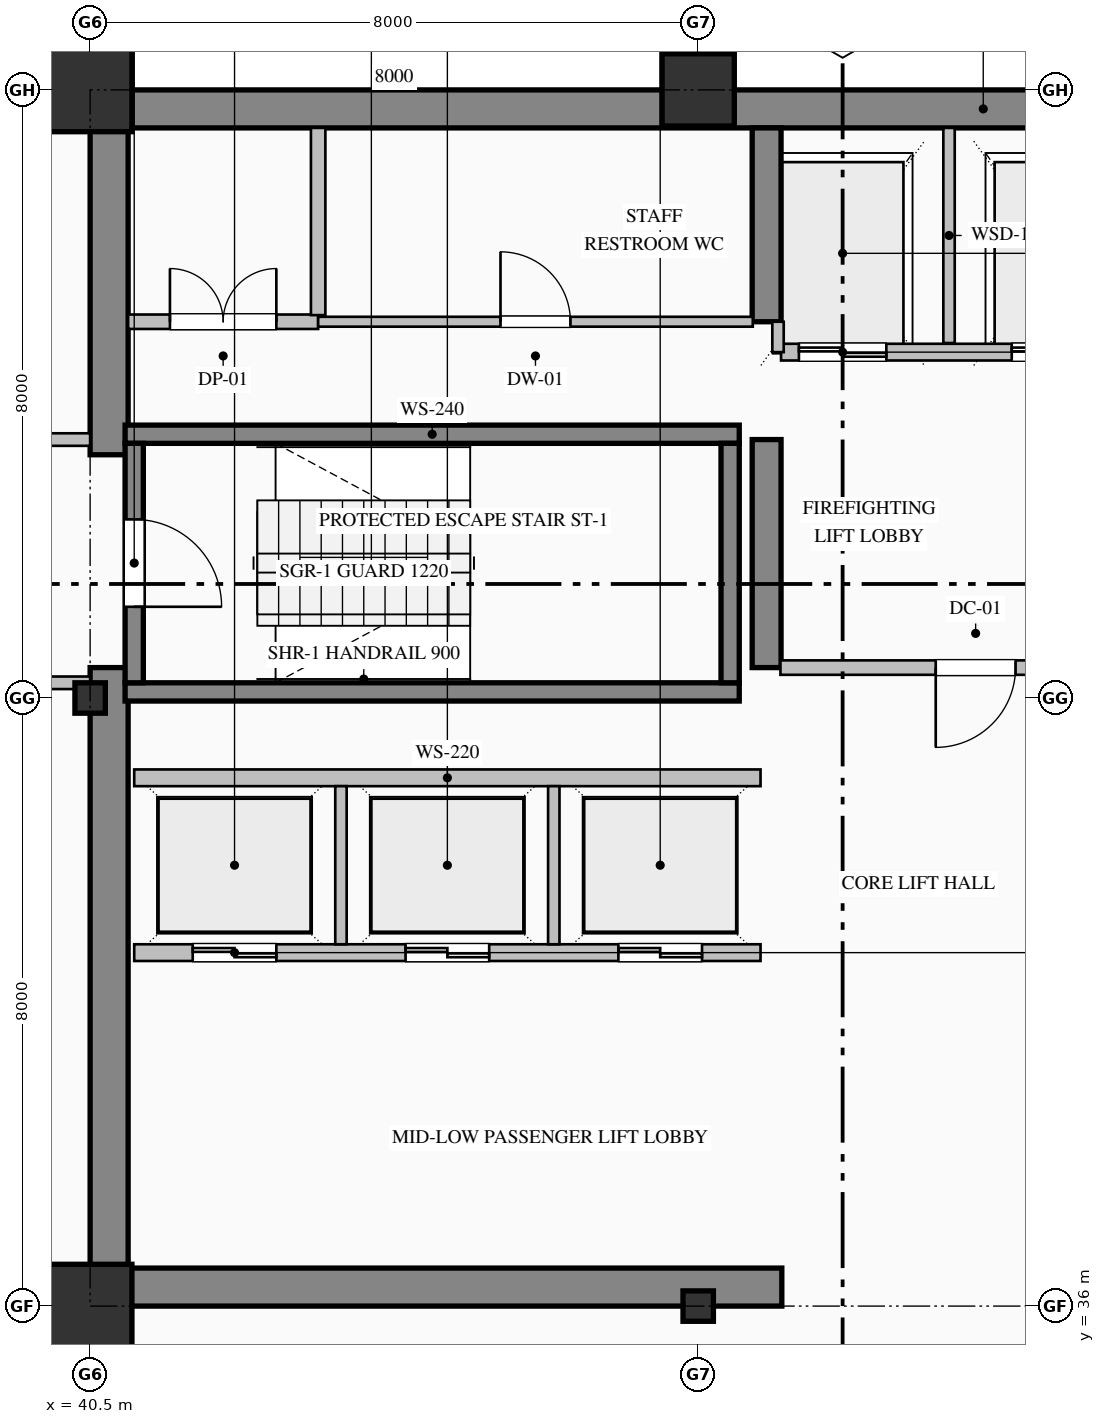
"""IFC4 building model, lengths in metres.
Left out: names, types, materials, properties, quantities, classifications, styles, units other than length and angle.
Written with IfcOpenShell. Run it as: python <this file> out.ifc"""

import sys

from ifc_helpers import new_model, si_unit, direction, frame, frame_2d, origin, origin_2d, place, context, subcontext, project, spatial, rectangle, hollow_rectangle, i_section, extrude, element, fill, save


model = new_model("IFC4")
c1 = context("Model", 3, precision=1e-05, world=origin(), true_north=direction((0.0, 1.0)))
c2 = subcontext(c1, "Body", "Model", "MODEL_VIEW")
j1 = project(units=[si_unit("LENGTHUNIT", "METRE"), si_unit("PLANEANGLEUNIT", "RADIAN")], contexts=[c1])
p1 = place(None, origin())
s1 = spatial("IfcSite", under=j1, at=p1, CompositionType="ELEMENT")
p2 = place(p1, origin())
s2 = spatial("IfcBuilding", under=s1, at=p2, CompositionType="ELEMENT")
p3 = place(p2, frame((0.0, 0.0, 179.0)))
s3 = spatial("IfcBuildingStorey", under=s2, at=p3, CompositionType="ELEMENT", Elevation=179.0)
p4 = place(p3, frame((40.5, 51.75, 0.0), z_axis=(0.0, 0.0, 1.0), x_axis=(1.0, 0.0, 0.0)))
e1 = element("IfcWall", 1, at=p4, inside=s3, PredefinedType="SHEAR", context=c2, shape_type="SweptSolid", body=[
    extrude(rectangle(XDim=23.5, YDim=0.5, at=frame_2d((11.75, 0.0))), origin(), (0.0, 0.0, 1.0), 3.765),
])
p5 = place(p3, frame((40.75, 36.5, 0.0), z_axis=(0.0, 0.0, 1.0), x_axis=(0.0, 1.0, 0.0)))
e2 = element("IfcWall", 2, at=p5, inside=s3, PredefinedType="SHEAR", context=c2, shape_type="SweptSolid", body=[
    extrude(rectangle(XDim=7.9, YDim=0.5, at=frame_2d((3.95, 0.0))), origin(), (0.0, 0.0, 1.0), 3.765),
])
p6 = place(p3, frame((40.75, 47.2, 0.0), z_axis=(0.0, 0.0, 1.0), x_axis=(0.0, 1.0, 0.0)))
e3 = element("IfcWall", 3, at=p6, inside=s3, PredefinedType="SHEAR", context=c2, shape_type="SweptSolid", body=[
    extrude(rectangle(XDim=4.3, YDim=0.5, at=frame_2d((2.15, 0.0))), origin(), (0.0, 0.0, 1.0), 3.765),
])
p7 = place(p3, frame((40.5, 36.25, 0.0), z_axis=(0.0, 0.0, 1.0), x_axis=(1.0, 0.0, 0.0)))
e4 = element("IfcWall", 4, at=p7, inside=s3, PredefinedType="SHEAR", context=c2, shape_type="SweptSolid", body=[
    extrude(rectangle(XDim=9.1, YDim=0.5, at=frame_2d((4.55, 0.0))), origin(), (0.0, 0.0, 1.0), 3.765),
])
p8 = place(p3, frame((49.4, 44.4, 0.0), z_axis=(0.0, 0.0, 1.0), x_axis=(0.0, 1.0, 0.0)))
e5 = element("IfcWall", 5, at=p8, inside=s3, PredefinedType="SHEAR", context=c2, shape_type="SweptSolid", body=[
    extrude(rectangle(XDim=3.0, YDim=0.38, at=frame_2d((1.5, 0.0))), origin(), (0.0, 0.0, 1.0), 3.765),
])
p9 = place(p3, frame((49.4, 48.95, 0.0), z_axis=(0.0, 0.0, 1.0), x_axis=(0.0, 1.0, 0.0)))
e6 = element("IfcWall", 6, at=p9, inside=s3, PredefinedType="SHEAR", context=c2, shape_type="SweptSolid", body=[
    extrude(rectangle(XDim=2.55, YDim=0.38, at=frame_2d((1.275, 0.0))), origin(), (0.0, 0.0, 1.0), 3.765),
])
p10 = place(p3, frame((40.5, 36.0, 0.0), z_axis=(0.0, 0.0, 1.0), x_axis=(1.0, 0.0, 0.0)))
e7 = element("IfcColumn", 7, at=p10, inside=s3, PredefinedType="COLUMN", context=c2, shape_type="SweptSolid", body=[
    extrude(hollow_rectangle(XDim=1.1, YDim=1.1, WallThickness=0.04, at=origin_2d()), origin(), (0.0, 0.0, 1.0), 4.0),
])
p11 = place(p3, frame((40.5, 44.0, 0.0), z_axis=(0.0, 0.0, 1.0), x_axis=(1.0, 0.0, 0.0)))
e8 = element("IfcColumn", 8, at=p11, inside=s3, PredefinedType="COLUMN", context=c2, shape_type="SweptSolid", body=[
    extrude(i_section(OverallWidth=0.4, OverallDepth=0.4, WebThickness=0.013, FlangeThickness=0.021, FilletRadius=0.022, at=origin_2d()), origin(), (0.0, 0.0, 1.0), 4.0),
])
p12 = place(p3, frame((40.5, 52.0, 0.0), z_axis=(0.0, 0.0, 1.0), x_axis=(1.0, 0.0, 0.0)))
e9 = element("IfcColumn", 9, at=p12, inside=s3, PredefinedType="COLUMN", context=c2, shape_type="SweptSolid", body=[
    extrude(hollow_rectangle(XDim=1.1, YDim=1.1, WallThickness=0.04, at=origin_2d()), origin(), (0.0, 0.0, 1.0), 4.0),
])
p13 = place(p3, frame((48.5, 36.0, 0.0), z_axis=(0.0, 0.0, 1.0), x_axis=(1.0, 0.0, 0.0)))
e10 = element("IfcColumn", 10, at=p13, inside=s3, PredefinedType="COLUMN", context=c2, shape_type="SweptSolid", body=[
    extrude(i_section(OverallWidth=0.4, OverallDepth=0.4, WebThickness=0.013, FlangeThickness=0.021, FilletRadius=0.022, at=origin_2d()), origin(), (0.0, 0.0, 1.0), 4.0),
])
p14 = place(p3, frame((48.5, 52.0, 0.0), z_axis=(0.0, 0.0, 1.0), x_axis=(1.0, 0.0, 0.0)))
e11 = element("IfcColumn", 11, at=p14, inside=s3, PredefinedType="COLUMN", context=c2, shape_type="SweptSolid", body=[
    extrude(hollow_rectangle(XDim=0.95, YDim=0.95, WallThickness=0.036, at=origin_2d()), origin(), (0.0, 0.0, 1.0), 4.0),
])
p15 = place(p3, frame((13.0, 51.82, 0.0), z_axis=(0.0, 0.0, 1.0), x_axis=(1.0, 0.0, 0.0)))
e12 = element("IfcWall", 12, at=p15, inside=s3, PredefinedType="SOLIDWALL", context=c2, shape_type="SweptSolid", body=[
    extrude(rectangle(XDim=27.52, YDim=0.36, at=frame_2d((13.76, 0.0))), origin(), (0.0, 0.0, 1.0), 3.265),
])
p16 = place(p15, frame((6.375, 0.0, 0.85)))
e13 = element("IfcOpeningElement", 13, at=p16, cuts=e12, PredefinedType="OPENING", context=c2, shape_type="SweptSolid", body=[
    extrude(rectangle(XDim=1.65, YDim=1.95, at=frame_2d((0.825, 0.975))), frame((0.0, 0.19, 0.0), z_axis=(0.0, -1.0, 0.0), x_axis=(1.0, 0.0, 0.0)), (0.0, 0.0, 1.0), 0.38),
])
p17 = place(p15, frame((13.65, 0.0, 0.85)))
e14 = element("IfcOpeningElement", 14, at=p17, cuts=e12, PredefinedType="OPENING", context=c2, shape_type="SweptSolid", body=[
    extrude(rectangle(XDim=1.5, YDim=1.95, at=frame_2d((0.75, 0.975))), frame((0.0, 0.19, 0.0), z_axis=(0.0, -1.0, 0.0), x_axis=(1.0, 0.0, 0.0)), (0.0, 0.0, 1.0), 0.38),
])
for number, where, z_axis, x_axis in (
    (15, (40.96, 47.47, 0.0), (0.0, 0.0, 1.0), (1.0, 0.0, 0.0)),
    (16, (49.04, 44.08, 0.0), (0.0, 0.0, 1.0), (-1.0, 0.0, 0.0)),
):
    element("IfcWall", number, at=place(p3, frame(where, z_axis=z_axis, x_axis=x_axis)), inside=s3, PredefinedType="SOLIDWALL", context=c2, shape_type="SweptSolid", body=[
        extrude(rectangle(XDim=8.08, YDim=0.24, at=frame_2d((4.04, 0.0))), origin(), (0.0, 0.0, 1.0), 4.0),
    ])
p18 = place(p3, frame((41.08, 47.35, 0.0), z_axis=(0.0, 0.0, 1.0), x_axis=(0.0, -1.0, 0.0)))
e17 = element("IfcWall", 17, at=p18, inside=s3, PredefinedType="SOLIDWALL", context=c2, shape_type="SweptSolid", body=[
    extrude(rectangle(XDim=3.15, YDim=0.24, at=frame_2d((1.575, 0.0))), origin(), (0.0, 0.0, 1.0), 4.0),
])
p19 = place(p18, frame((1.0, 0.0, 0.0)))
e18 = element("IfcOpeningElement", 18, at=p19, cuts=e17, PredefinedType="OPENING", context=c2, shape_type="SweptSolid", body=[
    extrude(rectangle(XDim=1.15, YDim=2.2, at=frame_2d((0.575, 1.1))), frame((0.0, 0.13, 0.0), z_axis=(0.0, -1.0, 0.0), x_axis=(1.0, 0.0, 0.0)), (0.0, 0.0, 1.0), 0.26),
])
p20 = place(p3, frame((48.92, 44.2, 0.0), z_axis=(0.0, 0.0, 1.0), x_axis=(0.0, 1.0, 0.0)))
e19 = element("IfcWall", 19, at=p20, inside=s3, PredefinedType="SOLIDWALL", context=c2, shape_type="SweptSolid", body=[
    extrude(rectangle(XDim=3.15, YDim=0.24, at=frame_2d((1.575, 0.0))), origin(), (0.0, 0.0, 1.0), 4.0),
])
p21 = place(p3, frame((54.71, 48.55, 0.0), z_axis=(0.0, 0.0, 1.0), x_axis=(-1.0, 0.0, 0.0)))
e20 = element("IfcWall", 20, at=p21, inside=s3, PredefinedType="PARTITIONING", context=c2, shape_type="SweptSolid", body=[
    extrude(rectangle(XDim=5.12, YDim=0.22, at=frame_2d((2.56, 0.0))), origin(), (0.0, 0.0, 1.0), 3.765),
])
p22 = place(p21, frame((3.735, 0.0, 0.0)))
e21 = element("IfcOpeningElement", 21, at=p22, cuts=e20, PredefinedType="OPENING", context=c2, shape_type="SweptSolid", body=[
    extrude(rectangle(XDim=1.15, YDim=2.2, at=frame_2d((0.575, 1.1))), frame((0.0, 0.12, 0.0), z_axis=(0.0, -1.0, 0.0), x_axis=(1.0, 0.0, 0.0)), (0.0, 0.0, 1.0), 0.24),
])
p23 = place(p21, frame((0.935, 0.0, 0.0)))
e22 = element("IfcOpeningElement", 22, at=p23, cuts=e20, PredefinedType="OPENING", context=c2, shape_type="SweptSolid", body=[
    extrude(rectangle(XDim=1.15, YDim=2.2, at=frame_2d((0.575, 1.1))), frame((0.0, 0.12, 0.0), z_axis=(0.0, -1.0, 0.0), x_axis=(1.0, 0.0, 0.0)), (0.0, 0.0, 1.0), 0.24),
])
p24 = place(p3, frame((51.8, 48.67, 0.0), z_axis=(0.0, 0.0, 1.0), x_axis=(0.0, 1.0, 0.0)))
e23 = element("IfcWall", 23, at=p24, inside=s3, PredefinedType="PARTITIONING", context=c2, shape_type="SweptSolid", body=[
    extrude(rectangle(XDim=2.83, YDim=0.15, at=frame_2d((1.415, 0.0))), origin(), (0.0, 0.0, 1.0), 3.765),
])
p25 = place(p3, frame((49.55, 48.55, 0.0), z_axis=(0.0, 0.0, 1.0), x_axis=(0.0, 1.0, 0.0)))
e24 = element("IfcWall", 24, at=p25, inside=s3, PredefinedType="PARTITIONING", context=c2, shape_type="SweptSolid", body=[
    extrude(rectangle(XDim=0.4, YDim=0.15, at=frame_2d((0.2, 0.0))), origin(), (0.0, 0.0, 1.0), 3.765),
])
p26 = place(p3, frame((49.32, 40.65, 0.0), z_axis=(0.0, 0.0, 1.0), x_axis=(-1.0, 0.0, 0.0)))
e25 = element("IfcWall", 25, at=p26, inside=s3, PredefinedType="PARTITIONING", context=c2, shape_type="SweptSolid", body=[
    extrude(rectangle(XDim=8.24, YDim=0.22, at=frame_2d((4.12, 0.0))), origin(), (0.0, 0.0, 1.0), 3.765),
])
p27 = place(p26, frame((6.37, 0.0, 0.0)))
e26 = element("IfcOpeningElement", 26, at=p27, cuts=e25, PredefinedType="OPENING", context=c2, shape_type="SweptSolid", body=[
    extrude(rectangle(XDim=1.1, YDim=2.2, at=frame_2d((0.55, 1.1))), frame((0.0, 0.12, 0.0), z_axis=(0.0, -1.0, 0.0), x_axis=(1.0, 0.0, 0.0)), (0.0, 0.0, 1.0), 0.24),
])
p28 = place(p26, frame((3.57, 0.0, 0.0)))
e27 = element("IfcOpeningElement", 27, at=p28, cuts=e25, PredefinedType="OPENING", context=c2, shape_type="SweptSolid", body=[
    extrude(rectangle(XDim=1.1, YDim=2.2, at=frame_2d((0.55, 1.1))), frame((0.0, 0.12, 0.0), z_axis=(0.0, -1.0, 0.0), x_axis=(1.0, 0.0, 0.0)), (0.0, 0.0, 1.0), 0.24),
])
p29 = place(p26, frame((0.77, 0.0, 0.0)))
e28 = element("IfcOpeningElement", 28, at=p29, cuts=e25, PredefinedType="OPENING", context=c2, shape_type="SweptSolid", body=[
    extrude(rectangle(XDim=1.1, YDim=2.2, at=frame_2d((0.55, 1.1))), frame((0.0, 0.12, 0.0), z_axis=(0.0, -1.0, 0.0), x_axis=(1.0, 0.0, 0.0)), (0.0, 0.0, 1.0), 0.24),
])
p30 = place(p3, frame((41.08, 42.95, 0.0), z_axis=(0.0, 0.0, 1.0), x_axis=(1.0, 0.0, 0.0)))
e29 = element("IfcWall", 29, at=p30, inside=s3, PredefinedType="PARTITIONING", context=c2, shape_type="SweptSolid", body=[
    extrude(rectangle(XDim=8.24, YDim=0.22, at=frame_2d((4.12, 0.0))), origin(), (0.0, 0.0, 1.0), 3.765),
])
for number, where, z_axis, x_axis in (
    (30, (43.8, 40.76, 0.0), (0.0, 0.0, 1.0), (0.0, 1.0, 0.0)),
    (31, (46.6, 40.76, 0.0), (0.0, 0.0, 1.0), (0.0, 1.0, 0.0)),
):
    element("IfcWall", number, at=place(p3, frame(where, z_axis=z_axis, x_axis=x_axis)), inside=s3, PredefinedType="PARTITIONING", context=c2, shape_type="SweptSolid", body=[
        extrude(rectangle(XDim=2.08, YDim=0.15, at=frame_2d((1.04, 0.0))), origin(), (0.0, 0.0, 1.0), 3.765),
    ])
p31 = place(p3, frame((37.8, 47.4, 0.0), z_axis=(0.0, 0.0, 1.0), x_axis=(1.0, 0.0, 0.0)))
e32 = element("IfcWall", 32, at=p31, inside=s3, PredefinedType="PARTITIONING", context=c2, shape_type="SweptSolid", body=[
    extrude(rectangle(XDim=2.7, YDim=0.165, at=frame_2d((1.35, 0.0))), origin(), (0.0, 0.0, 1.0), 3.765),
])
p32 = place(p31, frame((0.825, 0.0, 0.0)))
e33 = element("IfcOpeningElement", 33, at=p32, cuts=e32, PredefinedType="OPENING", context=c2, shape_type="SweptSolid", body=[
    extrude(rectangle(XDim=1.05, YDim=2.15, at=frame_2d((0.525, 1.075))), frame((0.0, 0.093, 0.0), z_axis=(0.0, -1.0, 0.0), x_axis=(1.0, 0.0, 0.0)), (0.0, 0.0, 1.0), 0.185),
])
p33 = place(p3, frame((40.5, 44.2, 0.0), z_axis=(0.0, 0.0, 1.0), x_axis=(-1.0, 0.0, 0.0)))
e34 = element("IfcWall", 34, at=p33, inside=s3, PredefinedType="PARTITIONING", context=c2, shape_type="SweptSolid", body=[
    extrude(rectangle(XDim=2.7, YDim=0.165, at=frame_2d((1.35, 0.0))), origin(), (0.0, 0.0, 1.0), 3.765),
])
p34 = place(p33, frame((0.825, 0.0, 0.0)))
e35 = element("IfcOpeningElement", 35, at=p34, cuts=e34, PredefinedType="OPENING", context=c2, shape_type="SweptSolid", body=[
    extrude(rectangle(XDim=1.05, YDim=2.15, at=frame_2d((0.525, 1.075))), frame((0.0, 0.093, 0.0), z_axis=(0.0, -1.0, 0.0), x_axis=(1.0, 0.0, 0.0)), (0.0, 0.0, 1.0), 0.185),
])
p35 = place(p3, frame((41.0, 48.95, 0.0), z_axis=(0.0, 0.0, 1.0), x_axis=(1.0, 0.0, 0.0)))
e36 = element("IfcWall", 36, at=p35, inside=s3, PredefinedType="PARTITIONING", context=c2, shape_type="SweptSolid", body=[
    extrude(rectangle(XDim=2.5, YDim=0.19, at=frame_2d((1.25, 0.0))), origin(), (0.0, 0.0, 1.0), 3.765),
])
p36 = place(p35, frame((0.55, 0.0, 0.0)))
e37 = element("IfcOpeningElement", 37, at=p36, cuts=e36, PredefinedType="OPENING", context=c2, shape_type="SweptSolid", body=[
    extrude(rectangle(XDim=1.4, YDim=2.25, at=frame_2d((0.7, 1.125))), frame((0.0, 0.105, 0.0), z_axis=(0.0, -1.0, 0.0), x_axis=(1.0, 0.0, 0.0)), (0.0, 0.0, 1.0), 0.21),
])
p37 = place(p3, frame((43.5, 48.95, 0.0), z_axis=(0.0, 0.0, 1.0), x_axis=(1.0, 0.0, 0.0)))
e38 = element("IfcWall", 38, at=p37, inside=s3, PredefinedType="PARTITIONING", context=c2, shape_type="SweptSolid", body=[
    extrude(rectangle(XDim=5.718, YDim=0.13, at=frame_2d((2.859, 0.0))), origin(), (0.0, 0.0, 1.0), 3.765),
])
p38 = place(p37, frame((2.399, 0.0, 0.0)))
e39 = element("IfcOpeningElement", 39, at=p38, cuts=e38, PredefinedType="OPENING", context=c2, shape_type="SweptSolid", body=[
    extrude(rectangle(XDim=0.92, YDim=2.15, at=frame_2d((0.46, 1.075))), frame((0.0, 0.075, 0.0), z_axis=(0.0, -1.0, 0.0), x_axis=(1.0, 0.0, 0.0)), (0.0, 0.0, 1.0), 0.15),
])
p39 = place(p3, frame((54.718, 44.4, 0.0), z_axis=(0.0, 0.0, 1.0), x_axis=(-1.0, 0.0, 0.0)))
e40 = element("IfcWall", 40, at=p39, inside=s3, PredefinedType="PARTITIONING", context=c2, shape_type="SweptSolid", body=[
    extrude(rectangle(XDim=5.136, YDim=0.19, at=frame_2d((2.568, 0.0))), origin(), (0.0, 0.0, 1.0), 3.765),
])
p40 = place(p39, frame((2.043, 0.0, 0.0)))
e41 = element("IfcOpeningElement", 41, at=p40, cuts=e40, PredefinedType="OPENING", context=c2, shape_type="SweptSolid", body=[
    extrude(rectangle(XDim=1.05, YDim=2.15, at=frame_2d((0.525, 1.075))), frame((0.0, 0.105, 0.0), z_axis=(0.0, -1.0, 0.0), x_axis=(1.0, 0.0, 0.0)), (0.0, 0.0, 1.0), 0.21),
])
p41 = place(p3, frame((43.5, 51.5, 0.0), z_axis=(0.0, 0.0, 1.0), x_axis=(0.0, -1.0, 0.0)))
e42 = element("IfcWall", 42, at=p41, inside=s3, PredefinedType="PARTITIONING", context=c2, shape_type="SweptSolid", body=[
    extrude(rectangle(XDim=2.463, YDim=0.19, at=frame_2d((1.231, 0.0))), origin(), (0.0, 0.0, 1.0), 3.765),
])
p42 = place(p19, origin())
e43 = element("IfcDoor", 43, at=p42, inside=s3, OperationType="SINGLE_SWING_RIGHT", PredefinedType="DOOR", context=c2, shape_type="SweptSolid", body=[
    extrude(rectangle(XDim=1.15, YDim=2.2, at=frame_2d((0.575, 1.1))), frame((0.0, 0.025, 0.0), z_axis=(0.0, -1.0, 0.0), x_axis=(1.0, 0.0, 0.0)), (0.0, 0.0, 1.0), 0.05),
])
fill(e18, e43)
p43 = place(p22, origin())
e44 = element("IfcDoor", 44, at=p43, inside=s3, OperationType="DOUBLE_DOOR_SLIDING", PredefinedType="DOOR", context=c2, shape_type="SweptSolid", body=[
    extrude(rectangle(XDim=1.15, YDim=2.2, at=frame_2d((0.575, 1.1))), frame((0.0, 0.025, 0.0), z_axis=(0.0, -1.0, 0.0), x_axis=(1.0, 0.0, 0.0)), (0.0, 0.0, 1.0), 0.05),
])
fill(e21, e44)
p44 = place(p23, origin())
e45 = element("IfcDoor", 45, at=p44, inside=s3, OperationType="DOUBLE_DOOR_SLIDING", PredefinedType="DOOR", context=c2, shape_type="SweptSolid", body=[
    extrude(rectangle(XDim=1.15, YDim=2.2, at=frame_2d((0.575, 1.1))), frame((0.0, 0.025, 0.0), z_axis=(0.0, -1.0, 0.0), x_axis=(1.0, 0.0, 0.0)), (0.0, 0.0, 1.0), 0.05),
])
fill(e22, e45)
p45 = place(p27, origin())
e46 = element("IfcDoor", 46, at=p45, inside=s3, OperationType="DOUBLE_DOOR_SLIDING", PredefinedType="DOOR", context=c2, shape_type="SweptSolid", body=[
    extrude(rectangle(XDim=1.1, YDim=2.2, at=frame_2d((0.55, 1.1))), frame((0.0, 0.025, 0.0), z_axis=(0.0, -1.0, 0.0), x_axis=(1.0, 0.0, 0.0)), (0.0, 0.0, 1.0), 0.05),
])
fill(e26, e46)
p46 = place(p28, origin())
e47 = element("IfcDoor", 47, at=p46, inside=s3, OperationType="DOUBLE_DOOR_SLIDING", PredefinedType="DOOR", context=c2, shape_type="SweptSolid", body=[
    extrude(rectangle(XDim=1.1, YDim=2.2, at=frame_2d((0.55, 1.1))), frame((0.0, 0.025, 0.0), z_axis=(0.0, -1.0, 0.0), x_axis=(1.0, 0.0, 0.0)), (0.0, 0.0, 1.0), 0.05),
])
fill(e27, e47)
p47 = place(p29, origin())
e48 = element("IfcDoor", 48, at=p47, inside=s3, OperationType="DOUBLE_DOOR_SLIDING", PredefinedType="DOOR", context=c2, shape_type="SweptSolid", body=[
    extrude(rectangle(XDim=1.1, YDim=2.2, at=frame_2d((0.55, 1.1))), frame((0.0, 0.025, 0.0), z_axis=(0.0, -1.0, 0.0), x_axis=(1.0, 0.0, 0.0)), (0.0, 0.0, 1.0), 0.05),
])
fill(e28, e48)
p48 = place(p40, origin())
e49 = element("IfcDoor", 49, at=p48, inside=s3, OperationType="SINGLE_SWING_RIGHT", PredefinedType="DOOR", context=c2, shape_type="SweptSolid", body=[
    extrude(rectangle(XDim=1.05, YDim=2.15, at=frame_2d((0.525, 1.075))), frame((0.0, 0.025, 0.0), z_axis=(0.0, -1.0, 0.0), x_axis=(1.0, 0.0, 0.0)), (0.0, 0.0, 1.0), 0.05),
])
fill(e41, e49)
p49 = place(p36, origin())
e50 = element("IfcDoor", 50, at=p49, inside=s3, OperationType="DOUBLE_DOOR_SINGLE_SWING", PredefinedType="DOOR", context=c2, shape_type="SweptSolid", body=[
    extrude(rectangle(XDim=1.4, YDim=2.25, at=frame_2d((0.7, 1.125))), frame((0.0, 0.025, 0.0), z_axis=(0.0, -1.0, 0.0), x_axis=(1.0, 0.0, 0.0)), (0.0, 0.0, 1.0), 0.05),
])
fill(e37, e50)
p50 = place(p38, origin())
e51 = element("IfcDoor", 51, at=p50, inside=s3, OperationType="SINGLE_SWING_LEFT", PredefinedType="DOOR", context=c2, shape_type="SweptSolid", body=[
    extrude(rectangle(XDim=0.92, YDim=2.15, at=frame_2d((0.46, 1.075))), frame((0.0, 0.025, 0.0), z_axis=(0.0, -1.0, 0.0), x_axis=(1.0, 0.0, 0.0)), (0.0, 0.0, 1.0), 0.05),
])
fill(e39, e51)
save(model, sys.argv[1])
